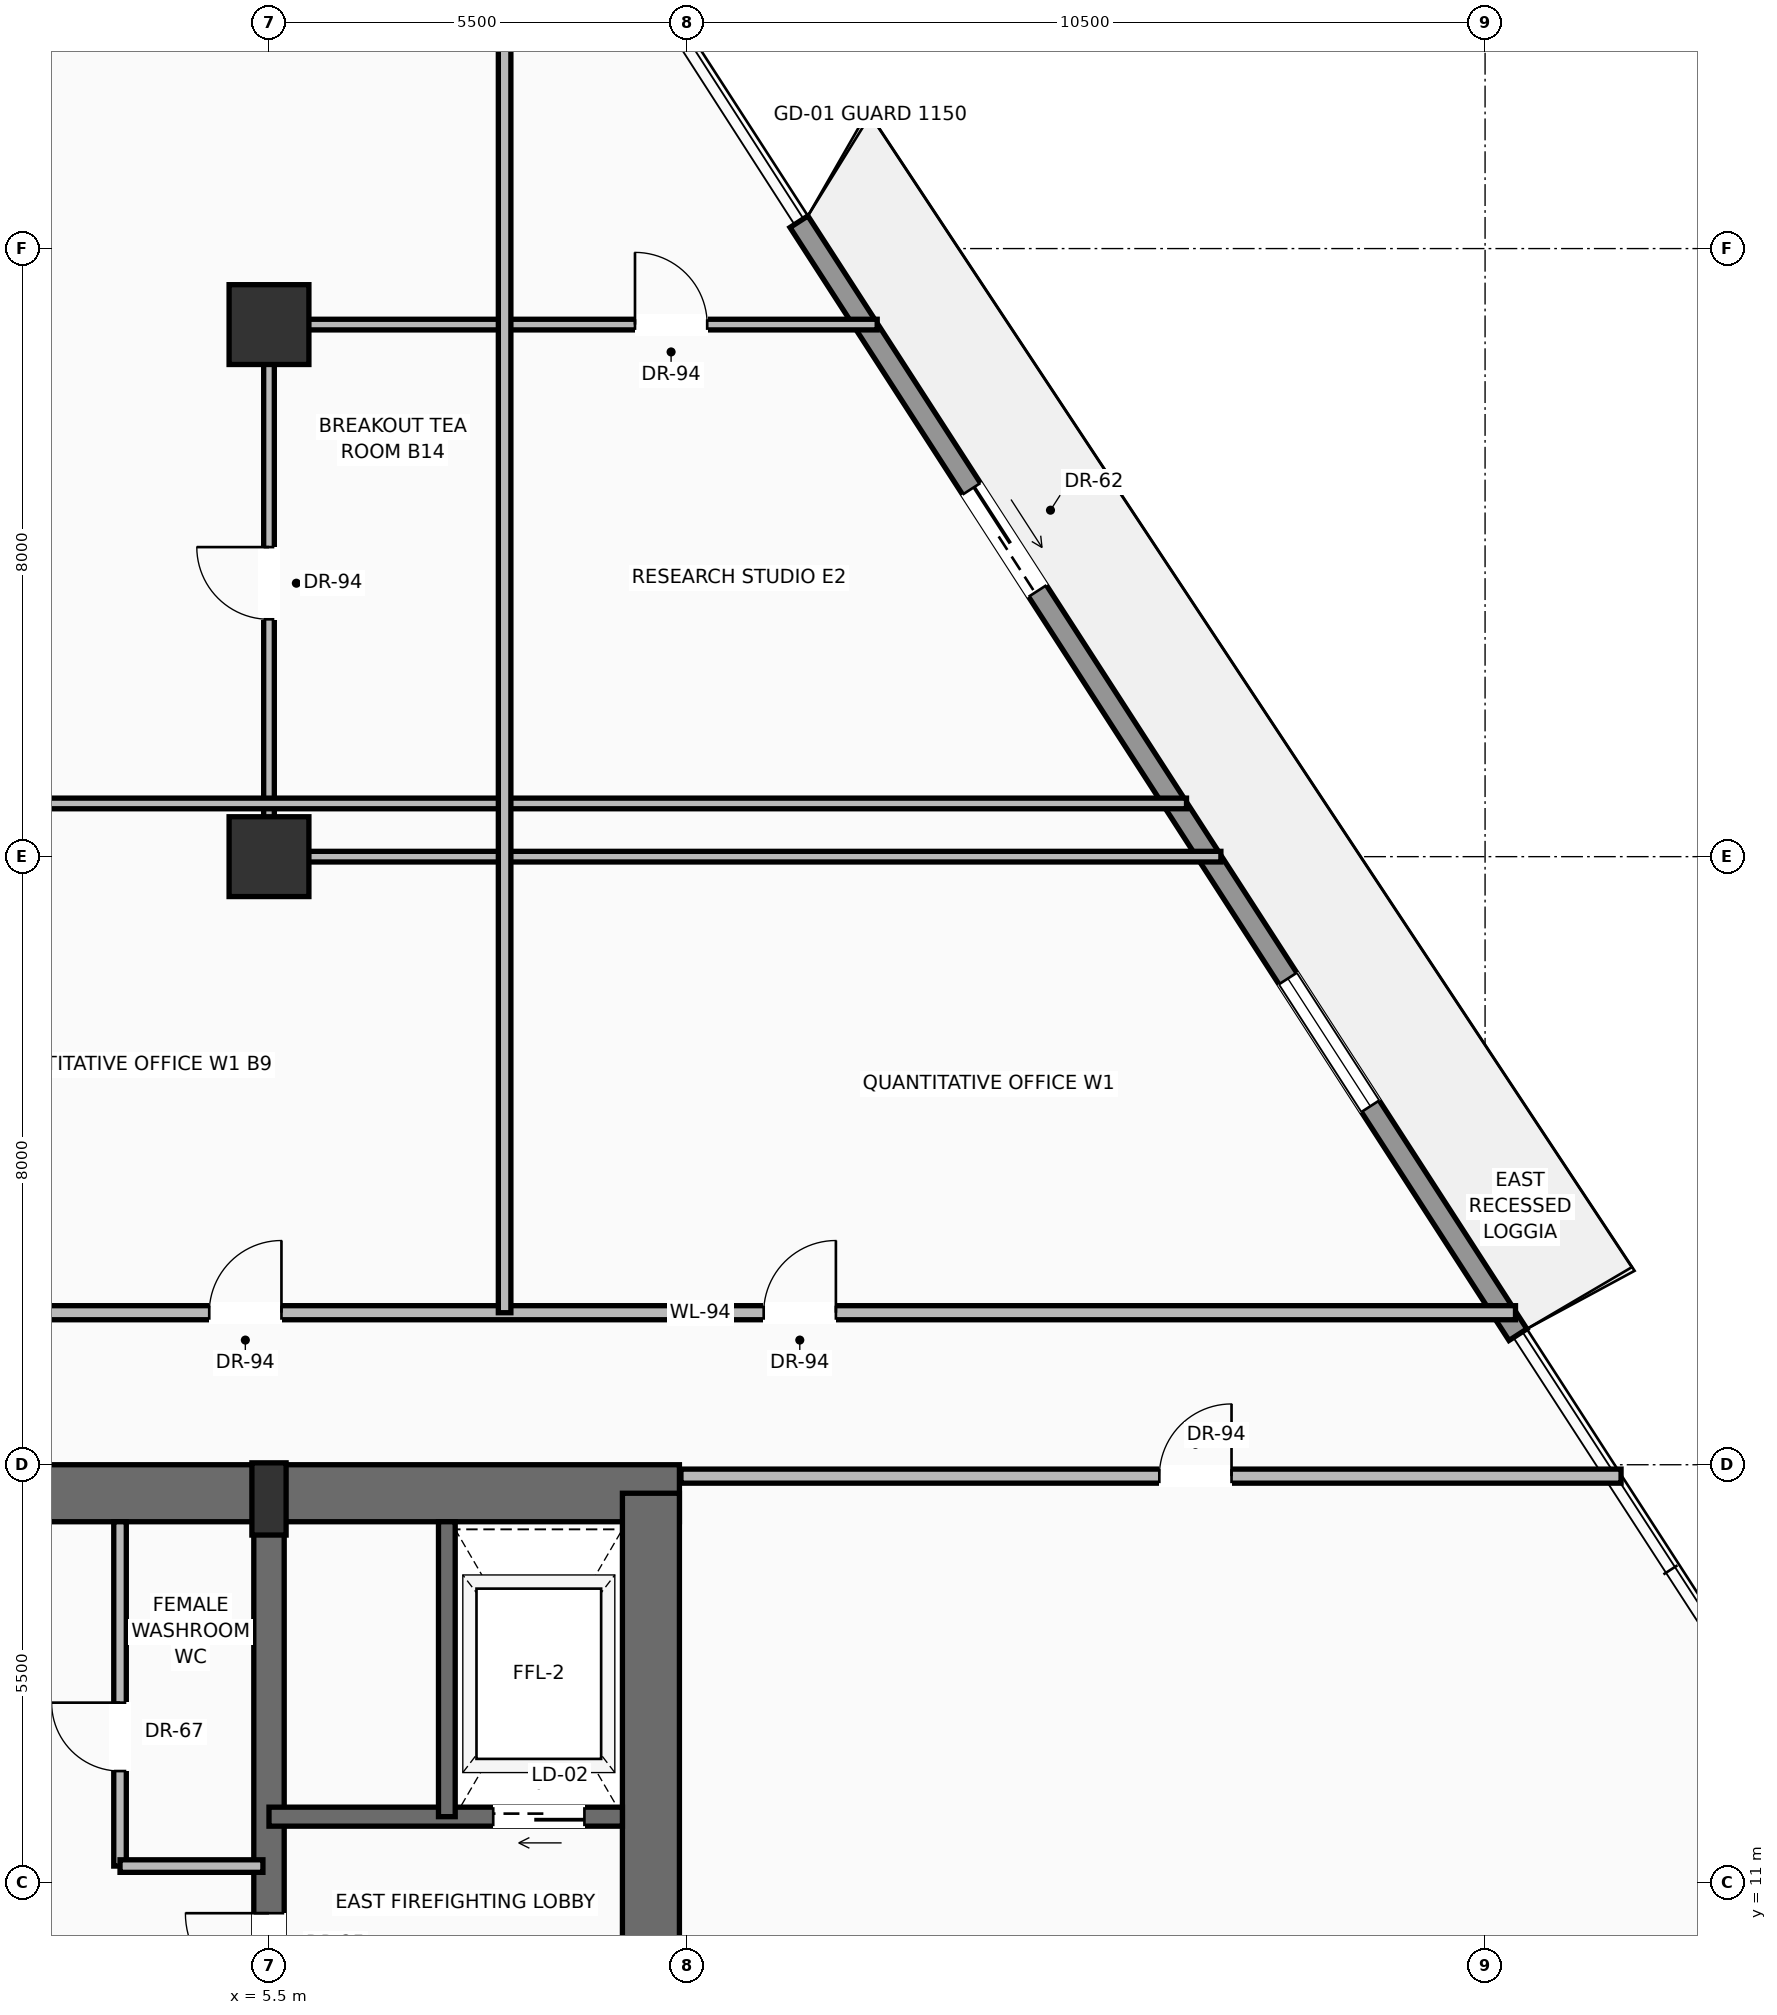
"""IFC4 building model, lengths in metres.
Left out: names, types, materials, properties, quantities, classifications, styles, units other than length and angle.
Written with IfcOpenShell. Run it as: python <this file> out.ifc"""

import sys

from ifc_helpers import new_model, si_unit, direction, frame, frame_2d, origin, origin_2d, place, context, subcontext, project, spatial, rectangle, extrude, source, transform, mapped, element, fill, save


model = new_model("IFC4")
c1 = context("Model", 3, precision=1e-05, world=origin(), true_north=direction((0.0, 1.0)))
c2 = subcontext(c1, "Body", "Model", "MODEL_VIEW")
j1 = project(units=[si_unit("LENGTHUNIT", "METRE"), si_unit("PLANEANGLEUNIT", "RADIAN")], contexts=[c1])
p1 = place(None, origin())
s1 = spatial("IfcSite", under=j1, at=p1, CompositionType="ELEMENT")
p2 = place(p1, origin())
s2 = spatial("IfcBuilding", under=s1, at=p2, CompositionType="ELEMENT")
p3 = place(p2, frame((0.0, 0.0, 98.8)))
s3 = spatial("IfcBuildingStorey", under=s2, at=p3, CompositionType="ELEMENT", Elevation=98.8)
p4 = place(p3, frame((-10.9, 16.125, 0.0), z_axis=(0.0, 0.0, 1.0), x_axis=(1.0, 0.0, 0.0)))
e1 = element("IfcWall", 1, at=p4, inside=s3, PredefinedType="SHEAR", context=c2, shape_type="SweptSolid", body=[
    extrude(rectangle(XDim=21.8, YDim=0.75, at=frame_2d((10.9, 0.0))), origin(), (0.0, 0.0, 1.0), 3.45),
])
p5 = place(p4, frame((3.47, 0.0, 0.0)))
e2 = element("IfcOpeningElement", 2, at=p5, cuts=e1, PredefinedType="OPENING", context=c2, shape_type="SweptSolid", body=[
    extrude(rectangle(XDim=1.3, YDim=2.3, at=frame_2d((0.65, 1.15))), frame((0.0, 0.385, 0.0), z_axis=(0.0, -1.0, 0.0), x_axis=(1.0, 0.0, 0.0)), (0.0, 0.0, 1.0), 0.77),
])
p6 = place(p4, frame((9.9, 0.0, 0.0)))
e3 = element("IfcOpeningElement", 3, at=p6, cuts=e1, PredefinedType="OPENING", context=c2, shape_type="SweptSolid", body=[
    extrude(rectangle(XDim=2.0, YDim=2.4, at=frame_2d((1.0, 1.2))), frame((0.0, 0.385, 0.0), z_axis=(0.0, -1.0, 0.0), x_axis=(1.0, 0.0, 0.0)), (0.0, 0.0, 1.0), 0.77),
])
p7 = place(p3, frame((10.525, 0.475, 0.0), z_axis=(0.0, 0.0, 1.0), x_axis=(0.0, 1.0, 0.0)))
e4 = element("IfcWall", 4, at=p7, inside=s3, PredefinedType="SHEAR", context=c2, shape_type="SweptSolid", body=[
    extrude(rectangle(XDim=15.65, YDim=0.75, at=frame_2d((7.825, 0.0))), origin(), (0.0, 0.0, 1.0), 3.45),
])
p8 = place(p3, frame((5.5, 0.475, 0.0), z_axis=(0.0, 0.0, 1.0), x_axis=(0.0, 1.0, 0.0)))
e5 = element("IfcWall", 5, at=p8, inside=s3, PredefinedType="SHEAR", context=c2, shape_type="SweptSolid", body=[
    extrude(rectangle(XDim=15.65, YDim=0.4, at=frame_2d((7.825, 0.0))), origin(), (0.0, 0.0, 1.0), 3.45),
])
p9 = place(p8, frame((9.025, 0.0, 0.0)))
e6 = element("IfcOpeningElement", 6, at=p9, cuts=e5, PredefinedType="OPENING", context=c2, shape_type="SweptSolid", body=[
    extrude(rectangle(XDim=1.1, YDim=2.2, at=frame_2d((0.55, 1.1))), frame((0.0, 0.21, 0.0), z_axis=(0.0, -1.0, 0.0), x_axis=(1.0, 0.0, 0.0)), (0.0, 0.0, 1.0), 0.42),
])
m1 = source(origin(), c2, "Body", "SweptSolid", [
    extrude(rectangle(XDim=0.45, YDim=0.95, at=origin_2d()), origin(), (0.0, 0.0, 1.0), 3.7),
])
p10 = place(p3, frame((5.5, 16.05, 0.0), z_axis=(0.0, 0.0, 1.0), x_axis=(1.0, 0.0, 0.0)))
e7 = element("IfcColumn", 7, at=p10, inside=s3, PredefinedType="PILASTER", context=c2, shape_type="MappedRepresentation", body=[
    mapped(m1, transform((0.0, 0.0, 0.0), scale=1.0)),
])
m2 = source(origin(), c2, "Body", "SweptSolid", [
    extrude(rectangle(XDim=1.05, YDim=1.05, at=origin_2d()), origin(), (0.0, 0.0, 1.0), 3.7),
])
for number, where, z_axis, x_axis in (
    (8, (5.5, 24.5, 0.0), (0.0, 0.0, 1.0), (1.0, 0.0, 0.0)),
    (9, (5.5, 31.5, 0.0), (0.0, 0.0, 1.0), (1.0, 0.0, 0.0)),
):
    element("IfcColumn", number, at=place(p3, frame(where, z_axis=z_axis, x_axis=x_axis)), inside=s3, PredefinedType="COLUMN", context=c2, shape_type="MappedRepresentation", body=[
        mapped(m2, transform((0.0, 0.0, 0.0), scale=1.0)),
    ])
p11 = place(p3, frame((12.473, 32.854, 0.0), z_axis=(0.0, 0.0, 1.0), x_axis=(0.54263907962, -0.839965969114, 0.0)))
e10 = element("IfcWall", 10, at=p11, inside=s3, PredefinedType="SOLIDWALL", context=c2, shape_type="SweptSolid", body=[
    extrude(rectangle(XDim=17.432, YDim=0.28, at=frame_2d((8.716, 0.0))), origin(), (0.0, 0.0, 1.0), 3.03),
])
p12 = place(p11, frame((4.184, 0.0, 0.0)))
e11 = element("IfcOpeningElement", 11, at=p12, cuts=e10, PredefinedType="OPENING", context=c2, shape_type="SweptSolid", body=[
    extrude(rectangle(XDim=1.6, YDim=2.35, at=frame_2d((0.8, 1.175))), frame((0.0, 0.15, 0.0), z_axis=(0.0, -1.0, 0.0), x_axis=(1.0, 0.0, 0.0)), (0.0, 0.0, 1.0), 0.3),
])
p13 = place(p11, frame((11.854, 0.0, 0.9)))
e12 = element("IfcOpeningElement", 12, at=p13, cuts=e10, PredefinedType="OPENING", context=c2, shape_type="SweptSolid", body=[
    extrude(rectangle(XDim=2.0, YDim=1.85, at=frame_2d((1.0, 0.925))), frame((0.0, 0.15, 0.0), z_axis=(0.0, -1.0, 0.0), x_axis=(1.0, 0.0, 0.0)), (0.0, 0.0, 1.0), 0.3),
])
p14 = place(p3, frame((10.15, 11.87, 0.0), z_axis=(0.0, 0.0, 1.0), x_axis=(-1.0, 0.0, 0.0)))
e13 = element("IfcWall", 13, at=p14, inside=s3, PredefinedType="SOLIDWALL", context=c2, shape_type="SweptSolid", body=[
    extrude(rectangle(XDim=4.65, YDim=0.25, at=frame_2d((2.325, 0.0))), origin(), (0.0, 0.0, 1.0), 3.45),
])
p15 = place(p14, frame((0.5, 0.0, 0.0)))
e14 = element("IfcOpeningElement", 14, at=p15, cuts=e13, PredefinedType="OPENING", context=c2, shape_type="SweptSolid", body=[
    extrude(rectangle(XDim=1.2, YDim=2.25, at=frame_2d((0.6, 1.125))), frame((0.0, 0.135, 0.0), z_axis=(0.0, -1.0, 0.0), x_axis=(1.0, 0.0, 0.0)), (0.0, 0.0, 1.0), 0.27),
])
p16 = place(p3, frame((7.84, 11.87, 0.0), z_axis=(0.0, 0.0, 1.0), x_axis=(0.0, 1.0, 0.0)))
e15 = element("IfcWall", 15, at=p16, inside=s3, PredefinedType="SOLIDWALL", context=c2, shape_type="SweptSolid", body=[
    extrude(rectangle(XDim=3.88, YDim=0.22, at=frame_2d((1.94, 0.0))), origin(), (0.0, 0.0, 1.0), 3.45),
])
p17 = place(p3, frame((3.54, 11.22, 0.0), z_axis=(0.0, 0.0, 1.0), x_axis=(0.0, 1.0, 0.0)))
e16 = element("IfcWall", 16, at=p17, inside=s3, PredefinedType="PARTITIONING", context=c2, shape_type="SweptSolid", body=[
    extrude(rectangle(XDim=4.53, YDim=0.165, at=frame_2d((2.265, 0.0))), origin(), (0.0, 0.0, 1.0), 3.442),
])
p18 = place(p17, frame((1.25, 0.0, 0.0)))
e17 = element("IfcOpeningElement", 17, at=p18, cuts=e16, PredefinedType="OPENING", context=c2, shape_type="SweptSolid", body=[
    extrude(rectangle(XDim=0.9, YDim=2.1, at=frame_2d((0.45, 1.05))), frame((0.0, 0.093, 0.0), z_axis=(0.0, -1.0, 0.0), x_axis=(1.0, 0.0, 0.0)), (0.0, 0.0, 1.0), 0.185),
])
p19 = place(p3, frame((3.54, 11.22, 0.0), z_axis=(0.0, 0.0, 1.0), x_axis=(1.0, 0.0, 0.0)))
e18 = element("IfcWall", 18, at=p19, inside=s3, PredefinedType="PARTITIONING", context=c2, shape_type="SweptSolid", body=[
    extrude(rectangle(XDim=1.88, YDim=0.165, at=frame_2d((0.94, 0.0))), origin(), (0.0, 0.0, 1.0), 3.442),
])
p20 = place(p3, frame((10.92, 16.35, 0.0), z_axis=(0.0, 0.0, 1.0), x_axis=(1.0, 0.0, 0.0)))
e19 = element("IfcWall", 19, at=p20, inside=s3, PredefinedType="PARTITIONING", context=c2, shape_type="SweptSolid", body=[
    extrude(rectangle(XDim=12.369, YDim=0.185, at=frame_2d((6.185, 0.0))), origin(), (0.0, 0.0, 1.0), 2.747),
])
p21 = place(p20, frame((6.294, 0.0, 0.0)))
e20 = element("IfcOpeningElement", 20, at=p21, cuts=e19, PredefinedType="OPENING", context=c2, shape_type="SweptSolid", body=[
    extrude(rectangle(XDim=0.95, YDim=2.2, at=frame_2d((0.475, 1.1))), frame((0.0, 0.103, 0.0), z_axis=(0.0, -1.0, 0.0), x_axis=(1.0, 0.0, 0.0)), (0.0, 0.0, 1.0), 0.205),
])
p22 = place(p3, frame((1.05, 18.5, 0.0), z_axis=(0.0, 0.0, 1.0), x_axis=(1.0, 0.0, 0.0)))
e21 = element("IfcWall", 21, at=p22, inside=s3, PredefinedType="PARTITIONING", context=c2, shape_type="SweptSolid", body=[
    extrude(rectangle(XDim=20.85, YDim=0.185, at=frame_2d((10.425, 0.0))), origin(), (0.0, 0.0, 1.0), 2.747),
])
p23 = place(p22, frame((10.959, 0.0, 0.0)))
e22 = element("IfcOpeningElement", 22, at=p23, cuts=e21, PredefinedType="OPENING", context=c2, shape_type="SweptSolid", body=[
    extrude(rectangle(XDim=0.95, YDim=2.2, at=frame_2d((0.475, 1.1))), frame((0.0, 0.103, 0.0), z_axis=(0.0, -1.0, 0.0), x_axis=(1.0, 0.0, 0.0)), (0.0, 0.0, 1.0), 0.205),
])
p24 = place(p22, frame((3.664, 0.0, 0.0)))
e23 = element("IfcOpeningElement", 23, at=p24, cuts=e21, PredefinedType="OPENING", context=c2, shape_type="SweptSolid", body=[
    extrude(rectangle(XDim=0.95, YDim=2.2, at=frame_2d((0.475, 1.1))), frame((0.0, 0.103, 0.0), z_axis=(0.0, -1.0, 0.0), x_axis=(1.0, 0.0, 0.0)), (0.0, 0.0, 1.0), 0.205),
])
p25 = place(p3, frame((5.5, 24.5, 0.0), z_axis=(0.0, 0.0, 1.0), x_axis=(1.0, 0.0, 0.0)))
e24 = element("IfcWall", 24, at=p25, inside=s3, PredefinedType="PARTITIONING", context=c2, shape_type="SweptSolid", body=[
    extrude(rectangle(XDim=12.524, YDim=0.14, at=frame_2d((6.262, 0.0))), origin(), (0.0, 0.0, 1.0), 2.747),
])
p26 = place(p3, frame((5.5, 24.5, 0.0), z_axis=(0.0, 0.0, 1.0), x_axis=(0.0, 1.0, 0.0)))
e25 = element("IfcWall", 25, at=p26, inside=s3, PredefinedType="PARTITIONING", context=c2, shape_type="SweptSolid", body=[
    extrude(rectangle(XDim=7.0, YDim=0.14, at=frame_2d((3.5, 0.0))), origin(), (0.0, 0.0, 1.0), 2.747),
])
p27 = place(p26, frame((3.123, 0.0, 0.0)))
e26 = element("IfcOpeningElement", 26, at=p27, cuts=e25, PredefinedType="OPENING", context=c2, shape_type="SweptSolid", body=[
    extrude(rectangle(XDim=0.95, YDim=2.2, at=frame_2d((0.475, 1.1))), frame((0.0, 0.08, 0.0), z_axis=(0.0, -1.0, 0.0), x_axis=(1.0, 0.0, 0.0)), (0.0, 0.0, 1.0), 0.16),
])
p28 = place(p3, frame((5.5, 31.5, 0.0), z_axis=(0.0, 0.0, 1.0), x_axis=(1.0, 0.0, 0.0)))
e27 = element("IfcWall", 27, at=p28, inside=s3, PredefinedType="PARTITIONING", context=c2, shape_type="SweptSolid", body=[
    extrude(rectangle(XDim=8.002, YDim=0.14, at=frame_2d((4.001, 0.0))), origin(), (0.0, 0.0, 1.0), 2.747),
])
p29 = place(p28, frame((4.815, 0.0, 0.0)))
e28 = element("IfcOpeningElement", 28, at=p29, cuts=e27, PredefinedType="OPENING", context=c2, shape_type="SweptSolid", body=[
    extrude(rectangle(XDim=0.95, YDim=2.2, at=frame_2d((0.475, 1.1))), frame((0.0, 0.08, 0.0), z_axis=(0.0, -1.0, 0.0), x_axis=(1.0, 0.0, 0.0)), (0.0, 0.0, 1.0), 0.16),
])
p30 = place(p3, frame((1.05, 25.2, 0.0), z_axis=(0.0, 0.0, 1.0), x_axis=(1.0, 0.0, 0.0)))
e29 = element("IfcWall", 29, at=p30, inside=s3, PredefinedType="PARTITIONING", context=c2, shape_type="SweptSolid", body=[
    extrude(rectangle(XDim=16.522, YDim=0.14, at=frame_2d((8.261, 0.0))), origin(), (0.0, 0.0, 1.0), 2.747),
])
p31 = place(p3, frame((8.6, 18.5, 0.0), z_axis=(0.0, 0.0, 1.0), x_axis=(0.0, 1.0, 0.0)))
e30 = element("IfcWall", 30, at=p31, inside=s3, PredefinedType="PARTITIONING", context=c2, shape_type="SweptSolid", body=[
    extrude(rectangle(XDim=17.5, YDim=0.165, at=frame_2d((8.75, 0.0))), origin(), (0.0, 0.0, 1.0), 2.747),
])
m3 = source(origin(), c2, "Body", "SweptSolid", [
    extrude(rectangle(XDim=1.6, YDim=2.35, at=frame_2d((0.8, 1.175))), frame((0.0, 0.025, 0.0), z_axis=(0.0, -1.0, 0.0), x_axis=(1.0, 0.0, 0.0)), (0.0, 0.0, 1.0), 0.05),
])
p32 = place(p12, origin())
e31 = element("IfcDoor", 31, at=p32, inside=s3, OperationType="SLIDING_TO_RIGHT", PredefinedType="DOOR", context=c2, shape_type="MappedRepresentation", body=[
    mapped(m3, transform((0.0, 0.0, 0.0), scale=1.0)),
])
fill(e11, e31)
m4 = source(origin(), c2, "Body", "SweptSolid", [
    extrude(rectangle(XDim=2.0, YDim=1.85, at=frame_2d((1.0, 0.925))), frame((0.0, 0.03, 0.0), z_axis=(0.0, -1.0, 0.0), x_axis=(1.0, 0.0, 0.0)), (0.0, 0.0, 1.0), 0.06),
])
p33 = place(p13, origin())
e32 = element("IfcWindow", 32, at=p33, inside=s3, PartitioningType="SINGLE_PANEL", PredefinedType="WINDOW", context=c2, shape_type="MappedRepresentation", body=[
    mapped(m4, transform((0.0, 0.0, 0.0), scale=1.0)),
])
fill(e12, e32)
m5 = source(origin(), c2, "Body", "SweptSolid", [
    extrude(rectangle(XDim=1.1, YDim=2.2, at=frame_2d((0.55, 1.1))), frame((0.0, 0.025, 0.0), z_axis=(0.0, -1.0, 0.0), x_axis=(1.0, 0.0, 0.0)), (0.0, 0.0, 1.0), 0.05),
])
p34 = place(p9, origin())
e33 = element("IfcDoor", 33, at=p34, inside=s3, OperationType="SINGLE_SWING_RIGHT", PredefinedType="DOOR", context=c2, shape_type="MappedRepresentation", body=[
    mapped(m5, transform((0.0, 0.0, 0.0), scale=1.0)),
])
fill(e6, e33)
m6 = source(origin(), c2, "Body", "SweptSolid", [
    extrude(rectangle(XDim=1.2, YDim=2.25, at=frame_2d((0.6, 1.125))), frame((0.0, 0.025, 0.0), z_axis=(0.0, -1.0, 0.0), x_axis=(1.0, 0.0, 0.0)), (0.0, 0.0, 1.0), 0.05),
])
p35 = place(p15, origin())
e34 = element("IfcDoor", 34, at=p35, inside=s3, OperationType="SLIDING_TO_RIGHT", PredefinedType="DOOR", context=c2, shape_type="MappedRepresentation", body=[
    mapped(m6, transform((0.0, 0.0, 0.0), scale=1.0)),
])
fill(e14, e34)
m7 = source(origin(), c2, "Body", "SweptSolid", [
    extrude(rectangle(XDim=0.9, YDim=2.1, at=frame_2d((0.45, 1.05))), frame((0.0, 0.025, 0.0), z_axis=(0.0, -1.0, 0.0), x_axis=(1.0, 0.0, 0.0)), (0.0, 0.0, 1.0), 0.05),
])
p36 = place(p18, origin())
e35 = element("IfcDoor", 35, at=p36, inside=s3, OperationType="SINGLE_SWING_RIGHT", PredefinedType="DOOR", context=c2, shape_type="MappedRepresentation", body=[
    mapped(m7, transform((0.0, 0.0, 0.0), scale=1.0)),
])
fill(e17, e35)
m8 = source(origin(), c2, "Body", "SweptSolid", [
    extrude(rectangle(XDim=0.95, YDim=2.2, at=frame_2d((0.475, 1.1))), frame((0.0, 0.025, 0.0), z_axis=(0.0, -1.0, 0.0), x_axis=(1.0, 0.0, 0.0)), (0.0, 0.0, 1.0), 0.05),
])
p37 = place(p21, origin())
e36 = element("IfcDoor", 36, at=p37, inside=s3, OperationType="SINGLE_SWING_RIGHT", PredefinedType="DOOR", context=c2, shape_type="MappedRepresentation", body=[
    mapped(m8, transform((0.0, 0.0, 0.0), scale=1.0)),
])
fill(e20, e36)
p38 = place(p23, origin())
e37 = element("IfcDoor", 37, at=p38, inside=s3, OperationType="SINGLE_SWING_RIGHT", PredefinedType="DOOR", context=c2, shape_type="MappedRepresentation", body=[
    mapped(m8, transform((0.0, 0.0, 0.0), scale=1.0)),
])
fill(e22, e37)
p39 = place(p24, origin())
e38 = element("IfcDoor", 38, at=p39, inside=s3, OperationType="SINGLE_SWING_RIGHT", PredefinedType="DOOR", context=c2, shape_type="MappedRepresentation", body=[
    mapped(m8, transform((0.0, 0.0, 0.0), scale=1.0)),
])
fill(e23, e38)
p40 = place(p29, origin())
e39 = element("IfcDoor", 39, at=p40, inside=s3, OperationType="SINGLE_SWING_LEFT", PredefinedType="DOOR", context=c2, shape_type="MappedRepresentation", body=[
    mapped(m8, transform((0.0, 0.0, 0.0), scale=1.0)),
])
fill(e28, e39)
p41 = place(p27, origin())
e40 = element("IfcDoor", 40, at=p41, inside=s3, OperationType="SINGLE_SWING_RIGHT", PredefinedType="DOOR", context=c2, shape_type="MappedRepresentation", body=[
    mapped(m8, transform((0.0, 0.0, 0.0), scale=1.0)),
])
fill(e26, e40)
save(model, sys.argv[1])
